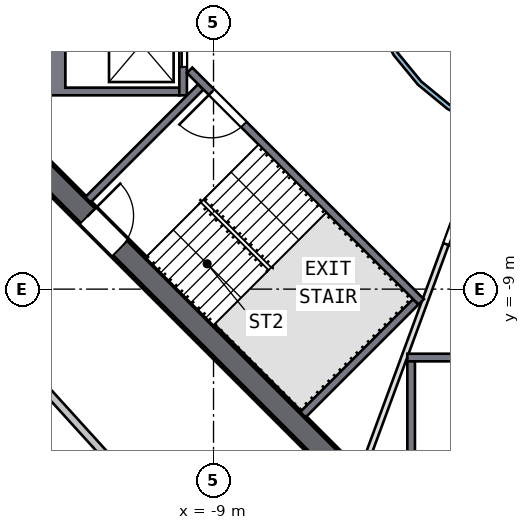
"""IFC4 building model, lengths in metres.
Left out: names, types, materials, properties, quantities, classifications, styles, units other than length and angle.
Written with IfcOpenShell. Run it as: python <this file> out.ifc"""

import sys

from ifc_helpers import new_model, si_unit, direction, frame, frame_2d, origin, place, context, subcontext, project, spatial, polyline, rectangle, outline, extrude, element, fill, save


model = new_model("IFC4")
c1 = context("Model", 3, precision=1e-05, world=origin(), true_north=direction((0.0, 1.0)))
c2 = subcontext(c1, "Body", "Model", "MODEL_VIEW")
j1 = project(units=[si_unit("LENGTHUNIT", "METRE"), si_unit("PLANEANGLEUNIT", "RADIAN")], contexts=[c1])
p1 = place(None, origin())
s1 = spatial("IfcSite", under=j1, at=p1, CompositionType="ELEMENT")
p2 = place(p1, origin())
s2 = spatial("IfcBuilding", under=s1, at=p2, CompositionType="ELEMENT")
p3 = place(p2, frame((0.0, 0.0, 205.5)))
s3 = spatial("IfcBuildingStorey", under=s2, at=p3, CompositionType="ELEMENT", Elevation=205.5)
p4 = place(p3, frame((-13.788, -5.587, 0.0), z_axis=(0.0, 0.0, 1.0), x_axis=(0.707106781, -0.707106781, 0.0)))
e1 = element("IfcWall", 1, at=p4, inside=s3, PredefinedType="SHEAR", context=c2, shape_type="SweptSolid", body=[
    extrude(rectangle(XDim=11.598, YDim=0.6, at=frame_2d((5.799, 0.0))), origin(), (0.0, 0.0, 1.0), 3.5),
])
p5 = place(p4, frame((2.099, 0.0, 0.0)))
e2 = element("IfcOpeningElement", 2, at=p5, cuts=e1, PredefinedType="OPENING", context=c2, shape_type="SweptSolid", body=[
    extrude(rectangle(XDim=1.2, YDim=2.1, at=frame_2d((0.6, 1.05))), frame((0.0, 0.31, 0.0), z_axis=(0.0, -1.0, 0.0), x_axis=(1.0, 0.0, 0.0)), (0.0, 0.0, 1.0), 0.62),
])
p6 = place(p3, origin())
e3 = element("IfcWall", 3, at=p6, inside=s3, PredefinedType="SOLIDWALL", context=c2, shape_type="SweptSolid", body=[
    extrude(outline(polyline([(-13.4, -3.9), (-13.4, -1.2), (-9.9, -1.2), (-9.9, -1.4), (-12.9, -1.4), (-12.9, -3.7), (-9.9, -3.7), (-9.9, -3.9), (-13.4, -3.9)])), origin(), (0.0, 0.0, 1.0), 3.19),
])
p7 = place(p3, frame((-9.8, -1.2, 0.0), z_axis=(0.0, 0.0, 1.0), x_axis=(0.0, -1.0, 0.0)))
e4 = element("IfcWall", 4, at=p7, inside=s3, PredefinedType="SOLIDWALL", context=c2, shape_type="SweptSolid", body=[
    extrude(rectangle(XDim=2.7, YDim=0.2, at=frame_2d((1.35, 0.0))), origin(), (0.0, 0.0, 1.0), 3.19),
])
p8 = place(p7, frame((0.75, 0.0, 0.0)))
e5 = element("IfcOpeningElement", 5, at=p8, cuts=e4, PredefinedType="OPENING", context=c2, shape_type="SweptSolid", body=[
    extrude(rectangle(XDim=1.2, YDim=2.1, at=frame_2d((0.6, 1.05))), frame((0.0, 0.11, 0.0), z_axis=(0.0, -1.0, 0.0), x_axis=(1.0, 0.0, 0.0)), (0.0, 0.0, 1.0), 0.22),
])
p9 = place(p3, frame((-3.9, -10.8, 0.0), z_axis=(0.0, 0.0, 1.0), x_axis=(1.0, 0.0, 0.0)))
e6 = element("IfcWall", 6, at=p9, inside=s3, PredefinedType="SOLIDWALL", context=c2, shape_type="SweptSolid", body=[
    extrude(rectangle(XDim=7.8, YDim=0.2, at=frame_2d((3.9, 0.0))), origin(), (0.0, 0.0, 1.0), 3.19),
])
p10 = place(p9, frame((3.45, 0.0, 0.0)))
e7 = element("IfcOpeningElement", 7, at=p10, cuts=e6, PredefinedType="OPENING", context=c2, shape_type="SweptSolid", body=[
    extrude(rectangle(XDim=0.9, YDim=2.1, at=frame_2d((0.45, 1.05))), frame((0.0, 0.11, 0.0), z_axis=(0.0, -1.0, 0.0), x_axis=(1.0, 0.0, 0.0)), (0.0, 0.0, 1.0), 0.22),
])
p11 = place(p3, frame((-3.8, -10.9, 0.0), z_axis=(0.0, 0.0, 1.0), x_axis=(0.0, -1.0, 0.0)))
e8 = element("IfcWall", 8, at=p11, inside=s3, PredefinedType="SOLIDWALL", context=c2, shape_type="SweptSolid", body=[
    extrude(rectangle(XDim=2.5, YDim=0.2, at=frame_2d((1.25, 0.0))), origin(), (0.0, 0.0, 1.0), 3.19),
])
p12 = place(p3, frame((-3.535, -9.334, 0.0), z_axis=(0.0, 0.0, 1.0), x_axis=(-0.707120946, 0.707092617, 0.0)))
e9 = element("IfcWall", 9, at=p12, inside=s3, PredefinedType="SOLIDWALL", context=c2, shape_type="SweptSolid", body=[
    extrude(rectangle(XDim=8.618, YDim=0.2, at=frame_2d((4.309, 0.0))), origin(), (0.0, 0.0, 1.0), 3.19),
])
p13 = place(p12, frame((6.6, 0.0, 0.0)))
e10 = element("IfcOpeningElement", 10, at=p13, cuts=e9, PredefinedType="OPENING", context=c2, shape_type="SweptSolid", body=[
    extrude(rectangle(XDim=1.2, YDim=2.1, at=frame_2d((0.6, 1.05))), frame((0.0, 0.11, 0.0), z_axis=(0.0, -1.0, 0.0), x_axis=(1.0, 0.0, 0.0)), (0.0, 0.0, 1.0), 0.22),
])
for number, where, z_axis, x_axis in (
    (11, (-9.334, -3.677, 0.0), (0.0, 0.0, 1.0), (-0.707, -0.707, 0.0)),
    (12, (-3.677, -9.334, 0.0), (0.0, 0.0, 1.0), (-0.707, -0.707, 0.0)),
):
    element("IfcWall", number, at=place(p3, frame(where, z_axis=z_axis, x_axis=x_axis)), inside=s3, PredefinedType="SOLIDWALL", context=c2, shape_type="SweptSolid", body=[
        extrude(rectangle(XDim=4.2, YDim=0.2, at=frame_2d((2.1, 0.0))), origin(), (0.0, 0.0, 1.0), 3.19),
    ])
p14 = place(p3, frame((-1.776, -4.813, 0.0), z_axis=(0.0, 0.0, 1.0), x_axis=(-0.346112108, -0.938193162, 0.0)))
e13 = element("IfcWall", 13, at=p14, inside=s3, PredefinedType="PARTITIONING", context=c2, shape_type="SweptSolid", body=[
    extrude(rectangle(XDim=9.123, YDim=0.15, at=frame_2d((4.562, 0.0))), origin(), (0.0, 0.0, 1.0), 3.19),
])
p15 = place(p14, frame((1.4, 0.0, 0.0)))
e14 = element("IfcOpeningElement", 14, at=p15, cuts=e13, PredefinedType="OPENING", context=c2, shape_type="SweptSolid", body=[
    extrude(rectangle(XDim=1.8, YDim=2.1, at=frame_2d((0.9, 1.05))), frame((0.0, 0.085, 0.0), z_axis=(0.0, -1.0, 0.0), x_axis=(1.0, 0.0, 0.0)), (0.0, 0.0, 1.0), 0.17),
])
p16 = place(p3, origin())
e15 = element("IfcWall", 15, at=p16, inside=s3, PredefinedType="SOLIDWALL", context=c2, shape_type="SweptSolid", body=[
    extrude(outline(polyline([(5.021, -0.999), (4.73, -1.959), (4.257, -2.844), (3.62, -3.62), (2.844, -4.257), (1.959, -4.73), (0.999, -5.021), (0.0, -5.12), (-0.999, -5.021), (-1.959, -4.73), (-2.844, -4.257), (-3.62, -3.62), (-4.257, -2.844), (-4.73, -1.959), (-5.021, -0.999), (-5.12, 0.0), (-5.021, 0.999), (-4.73, 1.959), (-4.257, 2.844), (-3.62, 3.62), (-2.844, 4.257), (-1.959, 4.73), (-0.999, 5.021), (0.0, 5.12), (0.999, 5.021), (1.959, 4.73), (2.844, 4.257), (3.62, 3.62), (4.257, 2.844), (4.73, 1.959), (5.021, 0.999), (5.12, 0.0), (5.021, -0.999)]), holes=[polyline([(4.904, 0.976), (4.619, 1.913), (4.157, 2.778), (3.535, 3.535), (2.778, 4.157), (1.913, 4.619), (0.976, 4.904), (0.0, 5.0), (-0.976, 4.904), (-1.913, 4.619), (-2.778, 4.157), (-3.535, 3.535), (-4.157, 2.778), (-4.619, 1.913), (-4.904, 0.976), (-5.0, 0.0), (-4.904, -0.976), (-4.619, -1.913), (-4.157, -2.778), (-3.535, -3.535), (-2.778, -4.157), (-1.913, -4.619), (-0.976, -4.904), (0.0, -5.0), (0.976, -4.904), (1.913, -4.619), (2.778, -4.157), (3.535, -3.535), (4.157, -2.778), (4.619, -1.913), (4.904, -0.976), (5.0, 0.0), (4.904, 0.976)])]), origin(), (0.0, 0.0, 1.0), 3.19),
])
p17 = place(p3, frame((-9.948, -15.46, 0.0), z_axis=(0.0, 0.0, 1.0), x_axis=(-0.672246163, 0.740327695, 0.0)))
e16 = element("IfcWall", 16, at=p17, inside=s3, PredefinedType="SOLIDWALL", context=c2, shape_type="SweptSolid", body=[
    extrude(rectangle(XDim=9.316, YDim=0.2, at=frame_2d((4.658, 0.0))), origin(), (0.0, 0.0, 1.0), 3.19),
])
p18 = place(p17, frame((5.15, 0.0, 0.0)))
e17 = element("IfcOpeningElement", 17, at=p18, cuts=e16, PredefinedType="OPENING", context=c2, shape_type="SweptSolid", body=[
    extrude(rectangle(XDim=1.0, YDim=2.1, at=frame_2d((0.5, 1.05))), frame((0.0, 0.11, 0.0), z_axis=(0.0, -1.0, 0.0), x_axis=(1.0, 0.0, 0.0)), (0.0, 0.0, 1.0), 0.22),
])
p19 = place(p8, origin())
e18 = element("IfcDoor", 18, at=p19, inside=s3, OperationType="DOUBLE_DOOR_SLIDING", PredefinedType="DOOR", context=c2, shape_type="SweptSolid", body=[
    extrude(rectangle(XDim=1.2, YDim=2.1, at=frame_2d((0.6, 1.05))), frame((0.0, 0.025, 0.0), z_axis=(0.0, -1.0, 0.0), x_axis=(1.0, 0.0, 0.0)), (0.0, 0.0, 1.0), 0.05),
])
fill(e5, e18)
p20 = place(p13, origin())
e19 = element("IfcDoor", 19, at=p20, inside=s3, OperationType="SINGLE_SWING_RIGHT", PredefinedType="DOOR", context=c2, shape_type="SweptSolid", body=[
    extrude(rectangle(XDim=1.2, YDim=2.1, at=frame_2d((0.6, 1.05))), frame((0.0, 0.025, 0.0), z_axis=(0.0, -1.0, 0.0), x_axis=(1.0, 0.0, 0.0)), (0.0, 0.0, 1.0), 0.05),
])
fill(e10, e19)
p21 = place(p5, origin())
e20 = element("IfcDoor", 20, at=p21, inside=s3, OperationType="SINGLE_SWING_LEFT", PredefinedType="DOOR", context=c2, shape_type="SweptSolid", body=[
    extrude(rectangle(XDim=1.2, YDim=2.1, at=frame_2d((0.6, 1.05))), frame((0.0, 0.025, 0.0), z_axis=(0.0, -1.0, 0.0), x_axis=(1.0, 0.0, 0.0)), (0.0, 0.0, 1.0), 0.05),
])
fill(e2, e20)
p22 = place(p15, origin())
e21 = element("IfcDoor", 21, at=p22, inside=s3, OperationType="DOUBLE_DOOR_SINGLE_SWING", PredefinedType="DOOR", context=c2, shape_type="SweptSolid", body=[
    extrude(rectangle(XDim=1.8, YDim=2.1, at=frame_2d((0.9, 1.05))), frame((0.0, 0.025, 0.0), z_axis=(0.0, -1.0, 0.0), x_axis=(1.0, 0.0, 0.0)), (0.0, 0.0, 1.0), 0.05),
])
fill(e14, e21)
save(model, sys.argv[1])
